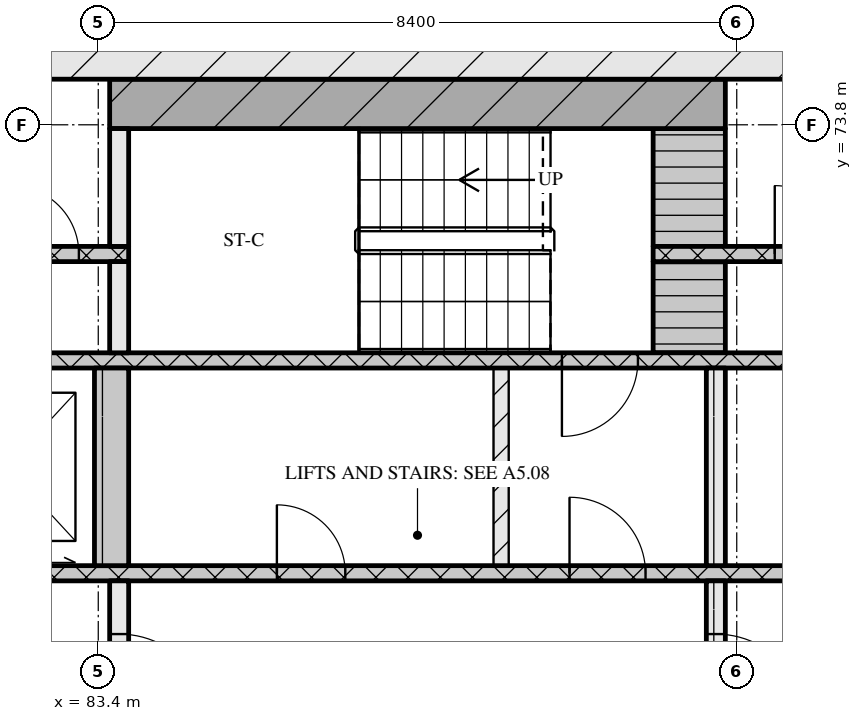
"""IFC4 building model, lengths in metres.
Left out: names, types, materials, properties, quantities, classifications, styles, units other than length and angle.
Written with IfcOpenShell. Run it as: python <this file> out.ifc"""

import sys

from ifc_helpers import new_model, si_unit, direction, frame, frame_2d, origin, place, context, subcontext, project, spatial, rectangle, extrude, element, fill, save


model = new_model("IFC4")
c1 = context("Model", 3, precision=1e-05, world=origin(), true_north=direction((0.0, 1.0)))
c2 = subcontext(c1, "Body", "Model", "MODEL_VIEW")
j1 = project(units=[si_unit("LENGTHUNIT", "METRE"), si_unit("PLANEANGLEUNIT", "RADIAN")], contexts=[c1])
p1 = place(None, origin())
s1 = spatial("IfcSite", under=j1, at=p1, CompositionType="ELEMENT")
p2 = place(p1, origin())
s2 = spatial("IfcBuilding", under=s1, at=p2, CompositionType="ELEMENT")
p3 = place(p2, frame((0.0, 0.0, 51.6)))
s3 = spatial("IfcBuildingStorey", under=s2, at=p3, CompositionType="ELEMENT", Elevation=51.6)
p4 = place(p3, frame((66.6, 75.0, 0.0), z_axis=(0.0, 0.0, 1.0), x_axis=(1.0, 0.0, 0.0)))
e1 = element("IfcWall", 1, at=p4, inside=s3, PredefinedType="SOLIDWALL", context=c2, shape_type="SweptSolid", body=[
    extrude(rectangle(XDim=42.0, YDim=1.2, at=frame_2d((21.0, 0.0))), origin(), (0.0, 0.0, 1.0), 3.32),
])
p5 = place(p3, frame((83.675, 65.2, 0.0), z_axis=(0.0, 0.0, 1.0), x_axis=(0.0, 1.0, 0.0)))
e2 = element("IfcWall", 2, at=p5, inside=s3, PredefinedType="SOLIDWALL", context=c2, shape_type="SweptSolid", body=[
    extrude(rectangle(XDim=2.6, YDim=0.25, at=frame_2d((1.3, 0.0))), origin(), (0.0, 0.0, 1.0), 3.32),
])
p6 = place(p5, frame((0.7, 0.0, 0.0)))
e3 = element("IfcOpeningElement", 3, at=p6, cuts=e2, PredefinedType="OPENING", context=c2, shape_type="SweptSolid", body=[
    extrude(rectangle(XDim=1.2, YDim=2.1, at=frame_2d((0.6, 1.05))), frame((0.0, 0.135, 0.0), z_axis=(0.0, -1.0, 0.0), x_axis=(1.0, 0.0, 0.0)), (0.0, 0.0, 1.0), 0.27),
])
p7 = place(p3, frame((91.525, 65.2, 0.0), z_axis=(0.0, 0.0, 1.0), x_axis=(0.0, 1.0, 0.0)))
e4 = element("IfcWall", 4, at=p7, inside=s3, PredefinedType="SOLIDWALL", context=c2, shape_type="SweptSolid", body=[
    extrude(rectangle(XDim=2.6, YDim=0.25, at=frame_2d((1.3, 0.0))), origin(), (0.0, 0.0, 1.0), 3.32),
])
p8 = place(p7, frame((0.7, 0.0, 0.0)))
e5 = element("IfcOpeningElement", 5, at=p8, cuts=e4, PredefinedType="OPENING", context=c2, shape_type="SweptSolid", body=[
    extrude(rectangle(XDim=1.2, YDim=2.1, at=frame_2d((0.6, 1.05))), frame((0.0, 0.135, 0.0), z_axis=(0.0, -1.0, 0.0), x_axis=(1.0, 0.0, 0.0)), (0.0, 0.0, 1.0), 0.27),
])
p9 = place(p3, frame((76.05, 67.9, 0.0), z_axis=(0.0, 0.0, 1.0), x_axis=(1.0, 0.0, 0.0)))
e6 = element("IfcWall", 6, at=p9, inside=s3, PredefinedType="SOLIDWALL", context=c2, shape_type="SweptSolid", body=[
    extrude(rectangle(XDim=23.1, YDim=0.2, at=frame_2d((11.55, 0.0))), origin(), (0.0, 0.0, 1.0), 3.32),
])
p10 = place(p9, frame((0.6, 0.0, 0.0)))
e7 = element("IfcOpeningElement", 7, at=p10, cuts=e6, PredefinedType="OPENING", context=c2, shape_type="SweptSolid", body=[
    extrude(rectangle(XDim=1.1, YDim=2.1, at=frame_2d((0.55, 1.05))), frame((0.0, 0.11, 0.0), z_axis=(0.0, -1.0, 0.0), x_axis=(1.0, 0.0, 0.0)), (0.0, 0.0, 1.0), 0.22),
])
p11 = place(p9, frame((3.1, 0.0, 0.0)))
e8 = element("IfcOpeningElement", 8, at=p11, cuts=e6, PredefinedType="OPENING", context=c2, shape_type="SweptSolid", body=[
    extrude(rectangle(XDim=1.1, YDim=2.1, at=frame_2d((0.55, 1.05))), frame((0.0, 0.11, 0.0), z_axis=(0.0, -1.0, 0.0), x_axis=(1.0, 0.0, 0.0)), (0.0, 0.0, 1.0), 0.22),
])
p12 = place(p9, frame((5.6, 0.0, 0.0)))
e9 = element("IfcOpeningElement", 9, at=p12, cuts=e6, PredefinedType="OPENING", context=c2, shape_type="SweptSolid", body=[
    extrude(rectangle(XDim=1.1, YDim=2.1, at=frame_2d((0.55, 1.05))), frame((0.0, 0.11, 0.0), z_axis=(0.0, -1.0, 0.0), x_axis=(1.0, 0.0, 0.0)), (0.0, 0.0, 1.0), 0.22),
])
p13 = place(p9, frame((9.7, 0.0, 0.0)))
e10 = element("IfcOpeningElement", 10, at=p13, cuts=e6, PredefinedType="OPENING", context=c2, shape_type="SweptSolid", body=[
    extrude(rectangle(XDim=0.9, YDim=2.1, at=frame_2d((0.45, 1.05))), frame((0.0, 0.11, 0.0), z_axis=(0.0, -1.0, 0.0), x_axis=(1.0, 0.0, 0.0)), (0.0, 0.0, 1.0), 0.22),
])
p14 = place(p9, frame((13.55, 0.0, 0.0)))
e11 = element("IfcOpeningElement", 11, at=p14, cuts=e6, PredefinedType="OPENING", context=c2, shape_type="SweptSolid", body=[
    extrude(rectangle(XDim=1.0, YDim=2.1, at=frame_2d((0.5, 1.05))), frame((0.0, 0.11, 0.0), z_axis=(0.0, -1.0, 0.0), x_axis=(1.0, 0.0, 0.0)), (0.0, 0.0, 1.0), 0.22),
])
p15 = place(p3, frame((83.575, 68.0, 0.0), z_axis=(0.0, 0.0, 1.0), x_axis=(0.0, 1.0, 0.0)))
e12 = element("IfcWall", 12, at=p15, inside=s3, PredefinedType="SOLIDWALL", context=c2, shape_type="SweptSolid", body=[
    extrude(rectangle(XDim=2.6, YDim=0.45, at=frame_2d((1.3, 0.0))), origin(), (0.0, 0.0, 1.0), 3.32),
])
p16 = place(p3, frame((88.7, 68.0, 0.0), z_axis=(0.0, 0.0, 1.0), x_axis=(0.0, 1.0, 0.0)))
e13 = element("IfcWall", 13, at=p16, inside=s3, PredefinedType="PARTITIONING", context=c2, shape_type="SweptSolid", body=[
    extrude(rectangle(XDim=2.6, YDim=0.2, at=frame_2d((1.3, 0.0))), origin(), (0.0, 0.0, 1.0), 3.32),
])
p17 = place(p3, frame((91.525, 68.0, 0.0), z_axis=(0.0, 0.0, 1.0), x_axis=(0.0, 1.0, 0.0)))
e14 = element("IfcWall", 14, at=p17, inside=s3, PredefinedType="SOLIDWALL", context=c2, shape_type="SweptSolid", body=[
    extrude(rectangle(XDim=2.6, YDim=0.25, at=frame_2d((1.3, 0.0))), origin(), (0.0, 0.0, 1.0), 3.32),
])
p18 = place(p3, frame((67.8, 70.7, 0.0), z_axis=(0.0, 0.0, 1.0), x_axis=(1.0, 0.0, 0.0)))
e15 = element("IfcWall", 15, at=p18, inside=s3, PredefinedType="SOLIDWALL", context=c2, shape_type="SweptSolid", body=[
    extrude(rectangle(XDim=39.6, YDim=0.2, at=frame_2d((19.8, 0.0))), origin(), (0.0, 0.0, 1.0), 3.32),
])
p19 = place(p18, frame((0.65, 0.0, 0.0)))
e16 = element("IfcOpeningElement", 16, at=p19, cuts=e15, PredefinedType="OPENING", context=c2, shape_type="SweptSolid", body=[
    extrude(rectangle(XDim=1.1, YDim=2.1, at=frame_2d((0.55, 1.05))), frame((0.0, 0.11, 0.0), z_axis=(0.0, -1.0, 0.0), x_axis=(1.0, 0.0, 0.0)), (0.0, 0.0, 1.0), 0.22),
])
p20 = place(p18, frame((3.25, 0.0, 0.0)))
e17 = element("IfcOpeningElement", 17, at=p20, cuts=e15, PredefinedType="OPENING", context=c2, shape_type="SweptSolid", body=[
    extrude(rectangle(XDim=1.1, YDim=2.1, at=frame_2d((0.55, 1.05))), frame((0.0, 0.11, 0.0), z_axis=(0.0, -1.0, 0.0), x_axis=(1.0, 0.0, 0.0)), (0.0, 0.0, 1.0), 0.22),
])
p21 = place(p18, frame((5.9, 0.0, 0.0)))
e18 = element("IfcOpeningElement", 18, at=p21, cuts=e15, PredefinedType="OPENING", context=c2, shape_type="SweptSolid", body=[
    extrude(rectangle(XDim=1.0, YDim=2.1, at=frame_2d((0.5, 1.05))), frame((0.0, 0.11, 0.0), z_axis=(0.0, -1.0, 0.0), x_axis=(1.0, 0.0, 0.0)), (0.0, 0.0, 1.0), 0.22),
])
p22 = place(p18, frame((21.7, 0.0, 0.0)))
e19 = element("IfcOpeningElement", 19, at=p22, cuts=e15, PredefinedType="OPENING", context=c2, shape_type="SweptSolid", body=[
    extrude(rectangle(XDim=1.0, YDim=2.1, at=frame_2d((0.5, 1.05))), frame((0.0, 0.11, 0.0), z_axis=(0.0, -1.0, 0.0), x_axis=(1.0, 0.0, 0.0)), (0.0, 0.0, 1.0), 0.22),
])
p23 = place(p18, frame((32.7, 0.0, 0.0)))
e20 = element("IfcOpeningElement", 20, at=p23, cuts=e15, PredefinedType="OPENING", context=c2, shape_type="SweptSolid", body=[
    extrude(rectangle(XDim=1.0, YDim=2.1, at=frame_2d((0.5, 1.05))), frame((0.0, 0.11, 0.0), z_axis=(0.0, -1.0, 0.0), x_axis=(1.0, 0.0, 0.0)), (0.0, 0.0, 1.0), 0.22),
])
p24 = place(p18, frame((35.25, 0.0, 0.0)))
e21 = element("IfcOpeningElement", 21, at=p24, cuts=e15, PredefinedType="OPENING", context=c2, shape_type="SweptSolid", body=[
    extrude(rectangle(XDim=1.1, YDim=2.1, at=frame_2d((0.55, 1.05))), frame((0.0, 0.11, 0.0), z_axis=(0.0, -1.0, 0.0), x_axis=(1.0, 0.0, 0.0)), (0.0, 0.0, 1.0), 0.22),
])
p25 = place(p18, frame((37.85, 0.0, 0.0)))
e22 = element("IfcOpeningElement", 22, at=p25, cuts=e15, PredefinedType="OPENING", context=c2, shape_type="SweptSolid", body=[
    extrude(rectangle(XDim=1.1, YDim=2.1, at=frame_2d((0.55, 1.05))), frame((0.0, 0.11, 0.0), z_axis=(0.0, -1.0, 0.0), x_axis=(1.0, 0.0, 0.0)), (0.0, 0.0, 1.0), 0.22),
])
p26 = place(p3, frame((83.675, 70.8, 0.0), z_axis=(0.0, 0.0, 1.0), x_axis=(0.0, 1.0, 0.0)))
e23 = element("IfcWall", 23, at=p26, inside=s3, PredefinedType="SOLIDWALL", context=c2, shape_type="SweptSolid", body=[
    extrude(rectangle(XDim=1.2, YDim=0.25, at=frame_2d((0.6, 0.0))), origin(), (0.0, 0.0, 1.0), 3.32),
])
p27 = place(p3, frame((91.175, 70.8, 0.0), z_axis=(0.0, 0.0, 1.0), x_axis=(0.0, 1.0, 0.0)))
e24 = element("IfcWall", 24, at=p27, inside=s3, PredefinedType="SOLIDWALL", context=c2, shape_type="SweptSolid", body=[
    extrude(rectangle(XDim=1.2, YDim=0.95, at=frame_2d((0.6, 0.0))), origin(), (0.0, 0.0, 1.0), 3.32),
])
p28 = place(p3, frame((72.8, 72.1, 0.0), z_axis=(0.0, 0.0, 1.0), x_axis=(1.0, 0.0, 0.0)))
e25 = element("IfcWall", 25, at=p28, inside=s3, PredefinedType="SOLIDWALL", context=c2, shape_type="SweptSolid", body=[
    extrude(rectangle(XDim=11.0, YDim=0.2, at=frame_2d((5.5, 0.0))), origin(), (0.0, 0.0, 1.0), 3.32),
])
p29 = place(p28, frame((1.25, 0.0, 0.0)))
e26 = element("IfcOpeningElement", 26, at=p29, cuts=e25, PredefinedType="OPENING", context=c2, shape_type="SweptSolid", body=[
    extrude(rectangle(XDim=0.9, YDim=2.1, at=frame_2d((0.45, 1.05))), frame((0.0, 0.11, 0.0), z_axis=(0.0, -1.0, 0.0), x_axis=(1.0, 0.0, 0.0)), (0.0, 0.0, 1.0), 0.22),
])
p30 = place(p28, frame((4.65, 0.0, 0.0)))
e27 = element("IfcOpeningElement", 27, at=p30, cuts=e25, PredefinedType="OPENING", context=c2, shape_type="SweptSolid", body=[
    extrude(rectangle(XDim=0.9, YDim=2.1, at=frame_2d((0.45, 1.05))), frame((0.0, 0.11, 0.0), z_axis=(0.0, -1.0, 0.0), x_axis=(1.0, 0.0, 0.0)), (0.0, 0.0, 1.0), 0.22),
])
p31 = place(p28, frame((7.47, 0.0, 0.0)))
e28 = element("IfcOpeningElement", 28, at=p31, cuts=e25, PredefinedType="OPENING", context=c2, shape_type="SweptSolid", body=[
    extrude(rectangle(XDim=0.9, YDim=2.1, at=frame_2d((0.45, 1.05))), frame((0.0, 0.11, 0.0), z_axis=(0.0, -1.0, 0.0), x_axis=(1.0, 0.0, 0.0)), (0.0, 0.0, 1.0), 0.22),
])
p32 = place(p28, frame((9.445, 0.0, 0.0)))
e29 = element("IfcOpeningElement", 29, at=p32, cuts=e25, PredefinedType="OPENING", context=c2, shape_type="SweptSolid", body=[
    extrude(rectangle(XDim=0.9, YDim=2.1, at=frame_2d((0.45, 1.05))), frame((0.0, 0.11, 0.0), z_axis=(0.0, -1.0, 0.0), x_axis=(1.0, 0.0, 0.0)), (0.0, 0.0, 1.0), 0.22),
])
p33 = place(p3, frame((90.7, 72.1, 0.0), z_axis=(0.0, 0.0, 1.0), x_axis=(1.0, 0.0, 0.0)))
e30 = element("IfcWall", 30, at=p33, inside=s3, PredefinedType="SOLIDWALL", context=c2, shape_type="SweptSolid", body=[
    extrude(rectangle(XDim=11.7, YDim=0.2, at=frame_2d((5.85, 0.0))), origin(), (0.0, 0.0, 1.0), 3.32),
])
p34 = place(p33, frame((1.6, 0.0, 0.0)))
e31 = element("IfcOpeningElement", 31, at=p34, cuts=e30, PredefinedType="OPENING", context=c2, shape_type="SweptSolid", body=[
    extrude(rectangle(XDim=0.9, YDim=2.1, at=frame_2d((0.45, 1.05))), frame((0.0, 0.11, 0.0), z_axis=(0.0, -1.0, 0.0), x_axis=(1.0, 0.0, 0.0)), (0.0, 0.0, 1.0), 0.22),
])
p35 = place(p33, frame((5.335, 0.0, 0.0)))
e32 = element("IfcOpeningElement", 32, at=p35, cuts=e30, PredefinedType="OPENING", context=c2, shape_type="SweptSolid", body=[
    extrude(rectangle(XDim=0.9, YDim=2.1, at=frame_2d((0.45, 1.05))), frame((0.0, 0.11, 0.0), z_axis=(0.0, -1.0, 0.0), x_axis=(1.0, 0.0, 0.0)), (0.0, 0.0, 1.0), 0.22),
])
p36 = place(p33, frame((9.55, 0.0, 0.0)))
e33 = element("IfcOpeningElement", 33, at=p36, cuts=e30, PredefinedType="OPENING", context=c2, shape_type="SweptSolid", body=[
    extrude(rectangle(XDim=0.9, YDim=2.1, at=frame_2d((0.45, 1.05))), frame((0.0, 0.11, 0.0), z_axis=(0.0, -1.0, 0.0), x_axis=(1.0, 0.0, 0.0)), (0.0, 0.0, 1.0), 0.22),
])
p37 = place(p3, frame((83.675, 72.2, 0.0), z_axis=(0.0, 0.0, 1.0), x_axis=(0.0, 1.0, 0.0)))
e34 = element("IfcWall", 34, at=p37, inside=s3, PredefinedType="SOLIDWALL", context=c2, shape_type="SweptSolid", body=[
    extrude(rectangle(XDim=1.55, YDim=0.25, at=frame_2d((0.775, 0.0))), origin(), (0.0, 0.0, 1.0), 3.32),
])
p38 = place(p3, frame((91.175, 72.2, 0.0), z_axis=(0.0, 0.0, 1.0), x_axis=(0.0, 1.0, 0.0)))
e35 = element("IfcWall", 35, at=p38, inside=s3, PredefinedType="SOLIDWALL", context=c2, shape_type="SweptSolid", body=[
    extrude(rectangle(XDim=1.55, YDim=0.95, at=frame_2d((0.775, 0.0))), origin(), (0.0, 0.0, 1.0), 3.32),
])
p39 = place(p3, frame((83.55, 74.075, 0.0), z_axis=(0.0, 0.0, 1.0), x_axis=(1.0, 0.0, 0.0)))
e36 = element("IfcWall", 36, at=p39, inside=s3, PredefinedType="SOLIDWALL", context=c2, shape_type="SweptSolid", body=[
    extrude(rectangle(XDim=8.1, YDim=0.65, at=frame_2d((4.05, 0.0))), origin(), (0.0, 0.0, 1.0), 3.32),
])
p40 = place(p6, origin())
e37 = element("IfcDoor", 37, at=p40, inside=s3, OperationType="SINGLE_SWING_RIGHT", PredefinedType="DOOR", context=c2, shape_type="SweptSolid", body=[
    extrude(rectangle(XDim=1.2, YDim=2.1, at=frame_2d((0.6, 1.05))), frame((0.0, 0.025, 0.0), z_axis=(0.0, -1.0, 0.0), x_axis=(1.0, 0.0, 0.0)), (0.0, 0.0, 1.0), 0.05),
])
fill(e3, e37)
p41 = place(p8, origin())
e38 = element("IfcDoor", 38, at=p41, inside=s3, OperationType="SINGLE_SWING_RIGHT", PredefinedType="DOOR", context=c2, shape_type="SweptSolid", body=[
    extrude(rectangle(XDim=1.2, YDim=2.1, at=frame_2d((0.6, 1.05))), frame((0.0, 0.025, 0.0), z_axis=(0.0, -1.0, 0.0), x_axis=(1.0, 0.0, 0.0)), (0.0, 0.0, 1.0), 0.05),
])
fill(e5, e38)
p42 = place(p13, origin())
e39 = element("IfcDoor", 39, at=p42, inside=s3, OperationType="SINGLE_SWING_LEFT", PredefinedType="DOOR", context=c2, shape_type="SweptSolid", body=[
    extrude(rectangle(XDim=0.9, YDim=2.1, at=frame_2d((0.45, 1.05))), frame((0.0, 0.025, 0.0), z_axis=(0.0, -1.0, 0.0), x_axis=(1.0, 0.0, 0.0)), (0.0, 0.0, 1.0), 0.05),
])
fill(e10, e39)
p43 = place(p14, origin())
e40 = element("IfcDoor", 40, at=p43, inside=s3, OperationType="SINGLE_SWING_LEFT", PredefinedType="DOOR", context=c2, shape_type="SweptSolid", body=[
    extrude(rectangle(XDim=1.0, YDim=2.1, at=frame_2d((0.5, 1.05))), frame((0.0, 0.025, 0.0), z_axis=(0.0, -1.0, 0.0), x_axis=(1.0, 0.0, 0.0)), (0.0, 0.0, 1.0), 0.05),
])
fill(e11, e40)
p44 = place(p22, origin())
e41 = element("IfcDoor", 41, at=p44, inside=s3, OperationType="SINGLE_SWING_RIGHT", PredefinedType="DOOR", context=c2, shape_type="SweptSolid", body=[
    extrude(rectangle(XDim=1.0, YDim=2.1, at=frame_2d((0.5, 1.05))), frame((0.0, 0.025, 0.0), z_axis=(0.0, -1.0, 0.0), x_axis=(1.0, 0.0, 0.0)), (0.0, 0.0, 1.0), 0.05),
])
fill(e19, e41)
p45 = place(p32, origin())
e42 = element("IfcDoor", 42, at=p45, inside=s3, OperationType="SINGLE_SWING_LEFT", PredefinedType="DOOR", context=c2, shape_type="SweptSolid", body=[
    extrude(rectangle(XDim=0.9, YDim=2.1, at=frame_2d((0.45, 1.05))), frame((0.0, 0.025, 0.0), z_axis=(0.0, -1.0, 0.0), x_axis=(1.0, 0.0, 0.0)), (0.0, 0.0, 1.0), 0.05),
])
fill(e29, e42)
p46 = place(p34, origin())
e43 = element("IfcDoor", 43, at=p46, inside=s3, OperationType="SINGLE_SWING_LEFT", PredefinedType="DOOR", context=c2, shape_type="SweptSolid", body=[
    extrude(rectangle(XDim=0.9, YDim=2.1, at=frame_2d((0.45, 1.05))), frame((0.0, 0.025, 0.0), z_axis=(0.0, -1.0, 0.0), x_axis=(1.0, 0.0, 0.0)), (0.0, 0.0, 1.0), 0.05),
])
fill(e31, e43)
save(model, sys.argv[1])
